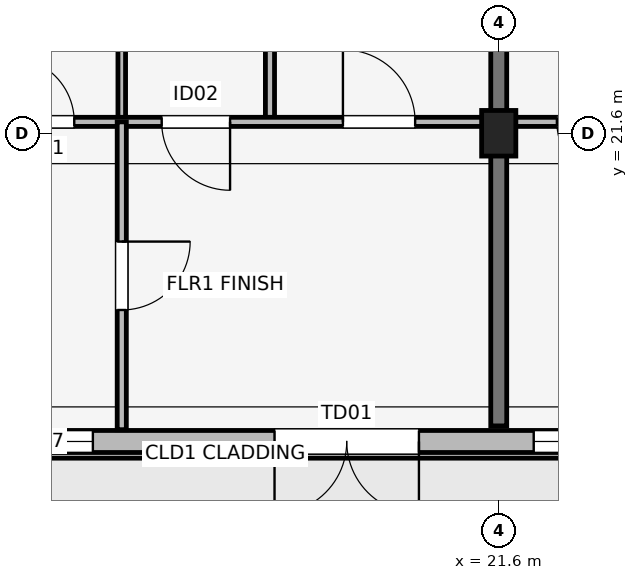
"""IFC4 building model, lengths in metres.
Left out: names, types, materials, properties, quantities, classifications, styles, units other than length and angle.
Written with IfcOpenShell. Run it as: python <this file> out.ifc"""

import sys

from ifc_helpers import new_model, si_unit, direction, frame, frame_2d, origin, origin_2d, place, context, subcontext, project, spatial, rectangle, extrude, element, fill, save


model = new_model("IFC4")
c1 = context("Model", 3, precision=1e-05, world=origin(), true_north=direction((0.0, 1.0)))
c2 = subcontext(c1, "Body", "Model", "MODEL_VIEW")
j1 = project(units=[si_unit("LENGTHUNIT", "METRE"), si_unit("PLANEANGLEUNIT", "RADIAN")], contexts=[c1])
p1 = place(None, origin())
s1 = spatial("IfcSite", under=j1, at=p1, CompositionType="ELEMENT")
p2 = place(p1, origin())
s2 = spatial("IfcBuilding", under=s1, at=p2, CompositionType="ELEMENT")
p3 = place(p2, frame((0.0, 0.0, 27.6)))
s3 = spatial("IfcBuildingStorey", under=s2, at=p3, CompositionType="ELEMENT", Elevation=27.6)
p4 = place(p3, frame((21.6, 21.6, 0.0), z_axis=(0.0, 0.0, 1.0), x_axis=(1.0, 0.0, 0.0)))
e1 = element("IfcColumn", 1, at=p4, inside=s3, PredefinedType="COLUMN", context=c2, shape_type="SweptSolid", body=[
    extrude(rectangle(XDim=0.45, YDim=0.6, at=origin_2d()), origin(), (0.0, 0.0, 1.0), 3.15),
])
p5 = place(p3, frame((21.6, 17.75, 0.0), z_axis=(0.0, 0.0, 1.0), x_axis=(0.0, 1.0, 0.0)))
e2 = element("IfcWall", 2, at=p5, inside=s3, PredefinedType="SHEAR", context=c2, shape_type="SweptSolid", body=[
    extrude(rectangle(XDim=6.4, YDim=0.21, at=frame_2d((3.2, 0.0))), origin(), (0.0, 0.0, 1.0), 3.15),
])
p6 = place(p3, frame((2.6, 17.545, 0.0), z_axis=(0.0, 0.0, 1.0), x_axis=(1.0, 0.0, 0.0)))
e3 = element("IfcWall", 3, at=p6, inside=s3, PredefinedType="SOLIDWALL", context=c2, shape_type="SweptSolid", body=[
    extrude(rectangle(XDim=30.8, YDim=0.29, at=frame_2d((15.4, 0.0))), origin(), (0.0, 0.0, 1.0), 2.43),
])
p7 = place(p6, frame((17.95, 0.0, 0.0), z_axis=(0.0, 0.0, 1.0), x_axis=(-1.0, 0.0, 0.0)))
e4 = element("IfcOpeningElement", 4, at=p7, cuts=e3, PredefinedType="OPENING", context=c2, shape_type="SweptSolid", body=[
    extrude(rectangle(XDim=1.9, YDim=2.2, at=frame_2d((0.95, 1.1))), frame((0.0, 0.155, 0.0), z_axis=(0.0, -1.0, 0.0), x_axis=(1.0, 0.0, 0.0)), (0.0, 0.0, 1.0), 0.31),
])
p8 = place(p6, frame((0.485, 0.0, 0.67)))
e5 = element("IfcOpeningElement", 5, at=p8, cuts=e3, PredefinedType="OPENING", context=c2, shape_type="SweptSolid", body=[
    extrude(rectangle(XDim=2.0, YDim=1.65, at=frame_2d((1.0, 0.825))), frame((0.0, 0.155, 0.0), z_axis=(0.0, -1.0, 0.0), x_axis=(1.0, 0.0, 0.0)), (0.0, 0.0, 1.0), 0.31),
])
p9 = place(p6, frame((3.145, 0.0, 0.75)))
e6 = element("IfcOpeningElement", 6, at=p9, cuts=e3, PredefinedType="OPENING", context=c2, shape_type="SweptSolid", body=[
    extrude(rectangle(XDim=0.98, YDim=1.45, at=frame_2d((0.49, 0.725))), frame((0.0, 0.155, 0.0), z_axis=(0.0, -1.0, 0.0), x_axis=(1.0, 0.0, 0.0)), (0.0, 0.0, 1.0), 0.31),
])
p10 = place(p6, frame((5.115, 0.0, 0.75)))
e7 = element("IfcOpeningElement", 7, at=p10, cuts=e3, PredefinedType="OPENING", context=c2, shape_type="SweptSolid", body=[
    extrude(rectangle(XDim=1.1, YDim=1.5, at=frame_2d((0.55, 0.75))), frame((0.0, 0.155, 0.0), z_axis=(0.0, -1.0, 0.0), x_axis=(1.0, 0.0, 0.0)), (0.0, 0.0, 1.0), 0.31),
])
p11 = place(p6, frame((7.9, 0.0, 0.67)))
e8 = element("IfcOpeningElement", 8, at=p11, cuts=e3, PredefinedType="OPENING", context=c2, shape_type="SweptSolid", body=[
    extrude(rectangle(XDim=2.45, YDim=1.65, at=frame_2d((1.225, 0.825))), frame((0.0, 0.155, 0.0), z_axis=(0.0, -1.0, 0.0), x_axis=(1.0, 0.0, 0.0)), (0.0, 0.0, 1.0), 0.31),
])
p12 = place(p6, frame((12.32, 0.0, 0.75)))
e9 = element("IfcOpeningElement", 9, at=p12, cuts=e3, PredefinedType="OPENING", context=c2, shape_type="SweptSolid", body=[
    extrude(rectangle(XDim=1.34, YDim=1.55, at=frame_2d((0.67, 0.775))), frame((0.0, 0.155, 0.0), z_axis=(0.0, -1.0, 0.0), x_axis=(1.0, 0.0, 0.0)), (0.0, 0.0, 1.0), 0.31),
])
p13 = place(p6, frame((19.46, 0.0, 0.75)))
e10 = element("IfcOpeningElement", 10, at=p13, cuts=e3, PredefinedType="OPENING", context=c2, shape_type="SweptSolid", body=[
    extrude(rectangle(XDim=1.46, YDim=1.55, at=frame_2d((0.73, 0.775))), frame((0.0, 0.155, 0.0), z_axis=(0.0, -1.0, 0.0), x_axis=(1.0, 0.0, 0.0)), (0.0, 0.0, 1.0), 0.31),
])
p14 = place(p6, frame((22.72, 0.0, 0.7)))
e11 = element("IfcOpeningElement", 11, at=p14, cuts=e3, PredefinedType="OPENING", context=c2, shape_type="SweptSolid", body=[
    extrude(rectangle(XDim=1.86, YDim=1.6, at=frame_2d((0.93, 0.8))), frame((0.0, 0.155, 0.0), z_axis=(0.0, -1.0, 0.0), x_axis=(1.0, 0.0, 0.0)), (0.0, 0.0, 1.0), 0.31),
])
p15 = place(p6, frame((27.49, 0.0, 0.67)))
e12 = element("IfcOpeningElement", 12, at=p15, cuts=e3, PredefinedType="OPENING", context=c2, shape_type="SweptSolid", body=[
    extrude(rectangle(XDim=2.0, YDim=1.65, at=frame_2d((1.0, 0.825))), frame((0.0, 0.155, 0.0), z_axis=(0.0, -1.0, 0.0), x_axis=(1.0, 0.0, 0.0)), (0.0, 0.0, 1.0), 0.31),
])
p16 = place(p3, frame((16.64, 21.75, 0.0), z_axis=(0.0, 0.0, 1.0), x_axis=(0.0, 1.0, 0.0)))
e13 = element("IfcWall", 13, at=p16, inside=s3, PredefinedType="PARTITIONING", context=c2, shape_type="SweptSolid", body=[
    extrude(rectangle(XDim=2.55, YDim=0.1, at=frame_2d((1.275, 0.0))), origin(), (0.0, 0.0, 1.0), 2.38),
])
p17 = place(p3, frame((18.59, 21.75, 0.0), z_axis=(0.0, 0.0, 1.0), x_axis=(0.0, 1.0, 0.0)))
e14 = element("IfcWall", 14, at=p17, inside=s3, PredefinedType="PARTITIONING", context=c2, shape_type="SweptSolid", body=[
    extrude(rectangle(XDim=2.55, YDim=0.12, at=frame_2d((1.275, 0.0))), origin(), (0.0, 0.0, 1.0), 2.38),
])
p18 = place(p3, frame((14.54, 21.75, 0.0), z_axis=(0.0, 0.0, 1.0), x_axis=(1.0, 0.0, 0.0)))
e15 = element("IfcWall", 15, at=p18, inside=s3, PredefinedType="PARTITIONING", context=c2, shape_type="SweptSolid", body=[
    extrude(rectangle(XDim=6.92, YDim=0.12, at=frame_2d((3.46, 0.0))), origin(), (0.0, 0.0, 1.0), 2.38),
])
p19 = place(p18, frame((0.625, 0.0, 0.0)))
e16 = element("IfcOpeningElement", 16, at=p19, cuts=e15, PredefinedType="OPENING", context=c2, shape_type="SweptSolid", body=[
    extrude(rectangle(XDim=0.85, YDim=2.08, at=frame_2d((0.425, 1.04))), frame((0.0, 0.07, 0.0), z_axis=(0.0, -1.0, 0.0), x_axis=(1.0, 0.0, 0.0)), (0.0, 0.0, 1.0), 0.14),
])
p20 = place(p18, frame((3.525, 0.0, 0.0), z_axis=(0.0, 0.0, 1.0), x_axis=(-1.0, 0.0, 0.0)))
e17 = element("IfcOpeningElement", 17, at=p20, cuts=e15, PredefinedType="OPENING", context=c2, shape_type="SweptSolid", body=[
    extrude(rectangle(XDim=0.9, YDim=2.08, at=frame_2d((0.45, 1.04))), frame((0.0, 0.07, 0.0), z_axis=(0.0, -1.0, 0.0), x_axis=(1.0, 0.0, 0.0)), (0.0, 0.0, 1.0), 0.14),
])
p21 = place(p18, frame((5.01, 0.0, 0.0)))
e18 = element("IfcOpeningElement", 18, at=p21, cuts=e15, PredefinedType="OPENING", context=c2, shape_type="SweptSolid", body=[
    extrude(rectangle(XDim=0.95, YDim=2.08, at=frame_2d((0.475, 1.04))), frame((0.0, 0.07, 0.0), z_axis=(0.0, -1.0, 0.0), x_axis=(1.0, 0.0, 0.0)), (0.0, 0.0, 1.0), 0.14),
])
p22 = place(p3, frame((16.64, 17.7, 0.0), z_axis=(0.0, 0.0, 1.0), x_axis=(0.0, 1.0, 0.0)))
e19 = element("IfcWall", 19, at=p22, inside=s3, PredefinedType="PARTITIONING", context=c2, shape_type="SweptSolid", body=[
    extrude(rectangle(XDim=4.05, YDim=0.12, at=frame_2d((2.025, 0.0))), origin(), (0.0, 0.0, 1.0), 2.38),
])
p23 = place(p22, frame((2.475, 0.0, 0.0), z_axis=(0.0, 0.0, 1.0), x_axis=(-1.0, 0.0, 0.0)))
e20 = element("IfcOpeningElement", 20, at=p23, cuts=e19, PredefinedType="OPENING", context=c2, shape_type="SweptSolid", body=[
    extrude(rectangle(XDim=0.9, YDim=2.08, at=frame_2d((0.45, 1.04))), frame((0.0, 0.07, 0.0), z_axis=(0.0, -1.0, 0.0), x_axis=(1.0, 0.0, 0.0)), (0.0, 0.0, 1.0), 0.14),
])
p24 = place(p3, frame((21.74, 21.75, 0.0), z_axis=(0.0, 0.0, 1.0), x_axis=(1.0, 0.0, 0.0)))
e21 = element("IfcWall", 21, at=p24, inside=s3, PredefinedType="PARTITIONING", context=c2, shape_type="SweptSolid", body=[
    extrude(rectangle(XDim=6.92, YDim=0.12, at=frame_2d((3.46, 0.0))), origin(), (0.0, 0.0, 1.0), 2.38),
])
p25 = place(p24, frame((1.475, 0.0, 0.0), z_axis=(0.0, 0.0, 1.0), x_axis=(-1.0, 0.0, 0.0)))
e22 = element("IfcOpeningElement", 22, at=p25, cuts=e21, PredefinedType="OPENING", context=c2, shape_type="SweptSolid", body=[
    extrude(rectangle(XDim=0.85, YDim=2.08, at=frame_2d((0.425, 1.04))), frame((0.0, 0.07, 0.0), z_axis=(0.0, -1.0, 0.0), x_axis=(1.0, 0.0, 0.0)), (0.0, 0.0, 1.0), 0.14),
])
p26 = place(p24, frame((2.775, 0.0, 0.0)))
e23 = element("IfcOpeningElement", 23, at=p26, cuts=e21, PredefinedType="OPENING", context=c2, shape_type="SweptSolid", body=[
    extrude(rectangle(XDim=0.9, YDim=2.08, at=frame_2d((0.45, 1.04))), frame((0.0, 0.07, 0.0), z_axis=(0.0, -1.0, 0.0), x_axis=(1.0, 0.0, 0.0)), (0.0, 0.0, 1.0), 0.14),
])
p27 = place(p24, frame((6.11, 0.0, 0.0), z_axis=(0.0, 0.0, 1.0), x_axis=(-1.0, 0.0, 0.0)))
e24 = element("IfcOpeningElement", 24, at=p27, cuts=e21, PredefinedType="OPENING", context=c2, shape_type="SweptSolid", body=[
    extrude(rectangle(XDim=0.95, YDim=2.08, at=frame_2d((0.475, 1.04))), frame((0.0, 0.07, 0.0), z_axis=(0.0, -1.0, 0.0), x_axis=(1.0, 0.0, 0.0)), (0.0, 0.0, 1.0), 0.14),
])
p28 = place(p7, origin())
e25 = element("IfcDoor", 25, at=p28, inside=s3, OperationType="DOUBLE_DOOR_SINGLE_SWING", PredefinedType="DOOR", context=c2, shape_type="SweptSolid", body=[
    extrude(rectangle(XDim=1.9, YDim=2.2, at=frame_2d((0.95, 1.1))), frame((0.0, 0.025, 0.0), z_axis=(0.0, -1.0, 0.0), x_axis=(1.0, 0.0, 0.0)), (0.0, 0.0, 1.0), 0.05),
])
fill(e4, e25)
p29 = place(p12, origin())
e26 = element("IfcWindow", 26, at=p29, inside=s3, PartitioningType="SINGLE_PANEL", PredefinedType="WINDOW", context=c2, shape_type="SweptSolid", body=[
    extrude(rectangle(XDim=1.34, YDim=1.55, at=frame_2d((0.67, 0.775))), frame((0.0, 0.03, 0.0), z_axis=(0.0, -1.0, 0.0), x_axis=(1.0, 0.0, 0.0)), (0.0, 0.0, 1.0), 0.06),
])
fill(e9, e26)
p30 = place(p13, origin())
e27 = element("IfcWindow", 27, at=p30, inside=s3, PartitioningType="SINGLE_PANEL", PredefinedType="WINDOW", context=c2, shape_type="SweptSolid", body=[
    extrude(rectangle(XDim=1.46, YDim=1.55, at=frame_2d((0.73, 0.775))), frame((0.0, 0.03, 0.0), z_axis=(0.0, -1.0, 0.0), x_axis=(1.0, 0.0, 0.0)), (0.0, 0.0, 1.0), 0.06),
])
fill(e10, e27)
p31 = place(p19, origin())
e28 = element("IfcDoor", 28, at=p31, inside=s3, OperationType="SINGLE_SWING_LEFT", PredefinedType="DOOR", context=c2, shape_type="SweptSolid", body=[
    extrude(rectangle(XDim=0.85, YDim=2.08, at=frame_2d((0.425, 1.04))), frame((0.0, 0.025, 0.0), z_axis=(0.0, -1.0, 0.0), x_axis=(1.0, 0.0, 0.0)), (0.0, 0.0, 1.0), 0.05),
])
fill(e16, e28)
p32 = place(p20, origin())
e29 = element("IfcDoor", 29, at=p32, inside=s3, OperationType="SINGLE_SWING_RIGHT", PredefinedType="DOOR", context=c2, shape_type="SweptSolid", body=[
    extrude(rectangle(XDim=0.9, YDim=2.08, at=frame_2d((0.45, 1.04))), frame((0.0, 0.025, 0.0), z_axis=(0.0, -1.0, 0.0), x_axis=(1.0, 0.0, 0.0)), (0.0, 0.0, 1.0), 0.05),
])
fill(e17, e29)
p33 = place(p21, origin())
e30 = element("IfcDoor", 30, at=p33, inside=s3, OperationType="SINGLE_SWING_LEFT", PredefinedType="DOOR", context=c2, shape_type="SweptSolid", body=[
    extrude(rectangle(XDim=0.95, YDim=2.08, at=frame_2d((0.475, 1.04))), frame((0.0, 0.025, 0.0), z_axis=(0.0, -1.0, 0.0), x_axis=(1.0, 0.0, 0.0)), (0.0, 0.0, 1.0), 0.05),
])
fill(e18, e30)
p34 = place(p23, origin())
e31 = element("IfcDoor", 31, at=p34, inside=s3, OperationType="SINGLE_SWING_RIGHT", PredefinedType="DOOR", context=c2, shape_type="SweptSolid", body=[
    extrude(rectangle(XDim=0.9, YDim=2.08, at=frame_2d((0.45, 1.04))), frame((0.0, 0.025, 0.0), z_axis=(0.0, -1.0, 0.0), x_axis=(1.0, 0.0, 0.0)), (0.0, 0.0, 1.0), 0.05),
])
fill(e20, e31)
p35 = place(p25, origin())
e32 = element("IfcDoor", 32, at=p35, inside=s3, OperationType="SINGLE_SWING_RIGHT", PredefinedType="DOOR", context=c2, shape_type="SweptSolid", body=[
    extrude(rectangle(XDim=0.85, YDim=2.08, at=frame_2d((0.425, 1.04))), frame((0.0, 0.025, 0.0), z_axis=(0.0, -1.0, 0.0), x_axis=(1.0, 0.0, 0.0)), (0.0, 0.0, 1.0), 0.05),
])
fill(e22, e32)
save(model, sys.argv[1])
